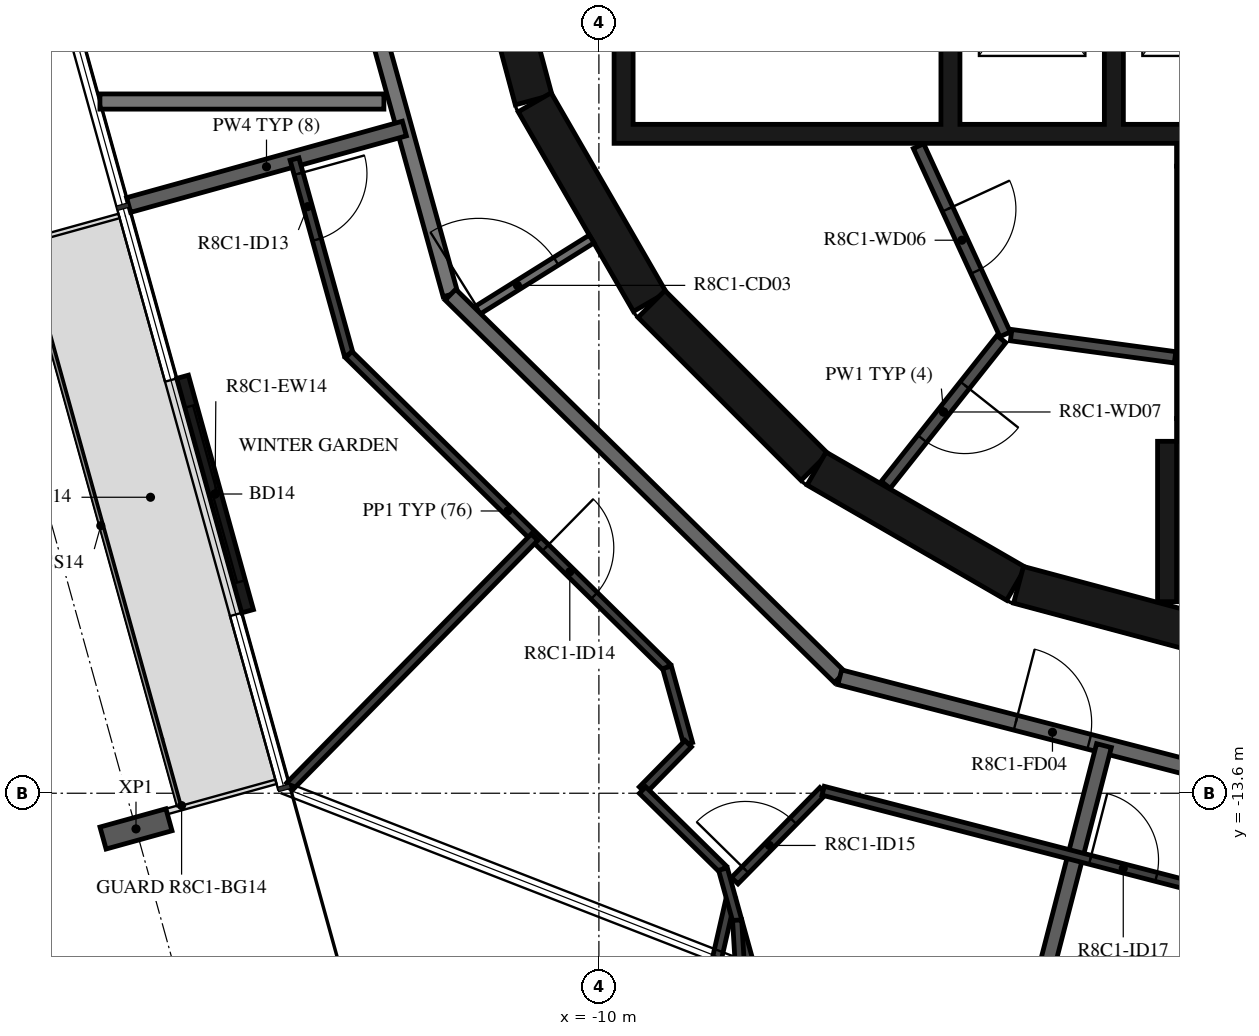
"""IFC4 building model, lengths in metres.
Left out: names, types, materials, properties, quantities, classifications, styles, units other than length and angle.
Written with IfcOpenShell. Run it as: python <this file> out.ifc"""

import sys

from ifc_helpers import new_model, si_unit, direction, frame, frame_2d, origin, origin_2d, place, context, subcontext, project, spatial, polyline, rectangle, i_section, outline, extrude, element, fill, save


model = new_model("IFC4")
c1 = context("Model", 3, precision=1e-05, world=origin(), true_north=direction((0.0, 1.0)))
c2 = subcontext(c1, "Body", "Model", "MODEL_VIEW")
j1 = project(units=[si_unit("LENGTHUNIT", "METRE"), si_unit("PLANEANGLEUNIT", "RADIAN")], contexts=[c1])
p1 = place(None, origin())
s1 = spatial("IfcSite", under=j1, at=p1, CompositionType="ELEMENT")
p2 = place(p1, origin())
s2 = spatial("IfcBuilding", under=s1, at=p2, CompositionType="ELEMENT")
p3 = place(p2, frame((0.0, 0.0, 322.7)))
s3 = spatial("IfcBuildingStorey", under=s2, at=p3, CompositionType="ELEMENT", Elevation=322.7)
p4 = place(p3, frame((-16.09, -14.069, -0.38), z_axis=(0.0, 0.0, 1.0), x_axis=(-0.267238143562, 0.963630517691, 0.0)))
e1 = element("IfcColumn", 1, at=p4, inside=s3, PredefinedType="COLUMN", context=c2, shape_type="SweptSolid", body=[
    extrude(i_section(OverallWidth=0.3, OverallDepth=0.9, WebThickness=0.019, FlangeThickness=0.035, FilletRadius=0.03, at=origin_2d()), origin(), (0.0, 0.0, 1.0), 2.616),
])
p5 = place(p3, frame((-15.477, -8.122, 0.0), z_axis=(0.0, 0.0, 1.0), x_axis=(0.267195229387, -0.963642417805, 0.0)))
e2 = element("IfcWall", 2, at=p5, inside=s3, PredefinedType="STANDARD", context=c2, shape_type="SweptSolid", body=[
    extrude(rectangle(XDim=3.2, YDim=0.16, at=frame_2d((1.6, 0.0))), origin(), (0.0, 0.0, 1.0), 3.05),
])
p6 = place(p5, frame((0.4, 0.0, 0.0)))
e3 = element("IfcOpeningElement", 3, at=p6, cuts=e2, PredefinedType="OPENING", context=c2, shape_type="SweptSolid", body=[
    extrude(rectangle(XDim=2.4, YDim=2.4, at=frame_2d((1.2, 1.2))), frame((0.0, 0.09, 0.0), z_axis=(0.0, -1.0, 0.0), x_axis=(1.0, 0.0, 0.0)), (0.0, 0.0, 1.0), 0.18),
])
p7 = place(p3, frame((-11.643, -1.55, 0.0), z_axis=(0.0, 0.0, 1.0), x_axis=(0.258734743916, -0.965948410781, 0.0)))
e4 = element("IfcWall", 4, at=p7, inside=s3, PredefinedType="SHEAR", context=c2, shape_type="SweptSolid", body=[
    extrude(rectangle(XDim=3.033, YDim=0.5, at=frame_2d((1.516, 0.0))), origin(), (0.0, 0.0, 1.0), 3.05),
])
p8 = place(p7, frame((1.066, 0.0, 0.0)))
e5 = element("IfcOpeningElement", 5, at=p8, cuts=e4, PredefinedType="OPENING", context=c2, shape_type="SweptSolid", body=[
    extrude(rectangle(XDim=0.9, YDim=2.1, at=frame_2d((0.45, 1.05))), frame((0.0, 0.26, 0.0), z_axis=(0.0, -1.0, 0.0), x_axis=(1.0, 0.0, 0.0)), (0.0, 0.0, 1.0), 0.52),
])
p9 = place(p3, frame((-10.845, -4.51, 0.0), z_axis=(0.0, 0.0, 1.0), x_axis=(0.500087131594, -0.865975092491, 0.0)))
e6 = element("IfcWall", 6, at=p9, inside=s3, PredefinedType="SHEAR", context=c2, shape_type="SweptSolid", body=[
    extrude(rectangle(XDim=3.033, YDim=0.5, at=frame_2d((1.516, 0.0))), origin(), (0.0, 0.0, 1.0), 3.05),
])
p10 = place(p3, frame((-9.308, -7.164, 0.0), z_axis=(0.0, 0.0, 1.0), x_axis=(0.707106781187, -0.707106781187, 0.0)))
e7 = element("IfcWall", 7, at=p10, inside=s3, PredefinedType="SHEAR", context=c2, shape_type="SweptSolid", body=[
    extrude(rectangle(XDim=3.032, YDim=0.5, at=frame_2d((1.516, 0.0))), origin(), (0.0, 0.0, 1.0), 3.05),
])
for number, where, z_axis, x_axis in (
    (8, (-7.137, -9.329, 0.0), (0.0, 0.0, 1.0), (0.866, -0.5, 0.0)),
    (9, (-4.479, -10.858, 0.0), (0.0, 0.0, 1.0), (0.966, -0.259, 0.0)),
):
    element("IfcWall", number, at=place(p3, frame(where, z_axis=z_axis, x_axis=x_axis)), inside=s3, PredefinedType="SHEAR", context=c2, shape_type="SweptSolid", body=[
        extrude(rectangle(XDim=3.033, YDim=0.5, at=frame_2d((1.516, 0.0))), origin(), (0.0, 0.0, 1.0), 3.05),
    ])
p11 = place(p3, frame((-2.275, -8.67, 0.0), z_axis=(0.0, 0.0, 1.0), x_axis=(0.0, 1.0, 0.0)))
e10 = element("IfcWall", 10, at=p11, inside=s3, PredefinedType="SHEAR", context=c2, shape_type="SweptSolid", body=[
    extrude(rectangle(XDim=3.32, YDim=0.25, at=frame_2d((1.66, 0.0))), origin(), (0.0, 0.0, 1.0), 3.05),
])
p12 = place(p3, frame((-2.4, -5.2, 0.0), z_axis=(0.0, 0.0, 1.0), x_axis=(1.0, 0.0, 0.0)))
e11 = element("IfcWall", 11, at=p12, inside=s3, PredefinedType="SHEAR", context=c2, shape_type="SweptSolid", body=[
    extrude(rectangle(XDim=7.05, YDim=0.3, at=frame_2d((3.525, 0.0))), origin(), (0.0, 0.0, 1.0), 3.05),
])
p13 = place(p3, frame((-2.4, -8.82, 0.0), z_axis=(0.0, 0.0, 1.0), x_axis=(1.0, 0.0, 0.0)))
e12 = element("IfcWall", 12, at=p13, inside=s3, PredefinedType="SHEAR", context=c2, shape_type="SweptSolid", body=[
    extrude(rectangle(XDim=2.5, YDim=0.3, at=frame_2d((1.25, 0.0))), origin(), (0.0, 0.0, 1.0), 3.05),
])
p14 = place(p13, frame((0.65, 0.0, 0.0)))
e13 = element("IfcOpeningElement", 13, at=p14, cuts=e12, PredefinedType="OPENING", context=c2, shape_type="SweptSolid", body=[
    extrude(rectangle(XDim=1.2, YDim=2.1, at=frame_2d((0.6, 1.05))), frame((0.0, 0.16, 0.0), z_axis=(0.0, -1.0, 0.0), x_axis=(1.0, 0.0, 0.0)), (0.0, 0.0, 1.0), 0.32),
])
p15 = place(p3, frame((-2.525, -8.97, 0.0), z_axis=(0.0, 0.0, 1.0), x_axis=(0.0, -1.0, 0.0)))
e14 = element("IfcWall", 14, at=p15, inside=s3, PredefinedType="SHEAR", context=c2, shape_type="SweptSolid", body=[
    extrude(rectangle(XDim=2.11, YDim=0.25, at=frame_2d((1.055, 0.0))), origin(), (0.0, 0.0, 1.0), 3.05),
])
p16 = place(p3, origin())
e15 = element("IfcWall", 15, at=p16, inside=s3, PredefinedType="SHEAR", context=c2, shape_type="SweptSolid", body=[
    extrude(outline(polyline([(9.8, -5.05), (9.8, -4.8), (9.8, -1.9), (9.55, -1.9), (9.55, -4.8), (7.65, -4.8), (7.65, -1.9), (7.4, -1.9), (7.4, -4.8), (5.5, -4.8), (5.5, -1.9), (5.25, -1.9), (5.25, -4.8), (3.35, -4.8), (3.35, -1.9), (3.1, -1.9), (3.1, -4.8), (1.2, -4.8), (1.2, -1.9), (0.95, -1.9), (0.95, -4.8), (-0.95, -4.8), (-0.95, -1.9), (-1.2, -1.9), (-1.2, -4.8), (-3.1, -4.8), (-3.1, -1.9), (-3.35, -1.9), (-3.35, -4.8), (-5.25, -4.8), (-5.25, -1.9), (-5.5, -1.9), (-5.5, -4.8), (-9.55, -4.8), (-9.55, -1.9), (-9.8, -1.9), (-9.8, -4.8), (-9.8, -5.05), (9.8, -5.05)])), origin(), (0.0, 0.0, 1.0), 3.05),
])
p17 = place(p3, frame((-5.795, -5.086, 0.0), z_axis=(0.0, 0.0, 1.0), x_axis=(0.417887867606, -0.908498613157, 0.0)))
e16 = element("IfcWall", 16, at=p17, inside=s3, PredefinedType="PARTITIONING", context=c2, shape_type="SweptSolid", body=[
    extrude(rectangle(XDim=2.726, YDim=0.15, at=frame_2d((1.363, 0.0))), origin(), (0.0, 0.0, 1.0), 3.05),
])
p18 = place(p17, frame((0.913, 0.0, 0.0)))
e17 = element("IfcOpeningElement", 17, at=p18, cuts=e16, PredefinedType="OPENING", context=c2, shape_type="SweptSolid", body=[
    extrude(rectangle(XDim=0.9, YDim=2.1, at=frame_2d((0.45, 1.05))), frame((0.0, 0.085, 0.0), z_axis=(0.0, -1.0, 0.0), x_axis=(1.0, 0.0, 0.0)), (0.0, 0.0, 1.0), 0.17),
])
p19 = place(p3, frame((-4.706, -7.625, 0.0), z_axis=(0.0, 0.0, 1.0), x_axis=(-0.621392599334, -0.783499353856, 0.0)))
e18 = element("IfcWall", 18, at=p19, inside=s3, PredefinedType="PARTITIONING", context=c2, shape_type="SweptSolid", body=[
    extrude(rectangle(XDim=2.447, YDim=0.15, at=frame_2d((1.224, 0.0))), origin(), (0.0, 0.0, 1.0), 3.05),
])
p20 = place(p19, frame((0.774, 0.0, 0.0)))
e19 = element("IfcOpeningElement", 19, at=p20, cuts=e18, PredefinedType="OPENING", context=c2, shape_type="SweptSolid", body=[
    extrude(rectangle(XDim=0.9, YDim=2.1, at=frame_2d((0.45, 1.05))), frame((0.0, 0.085, 0.0), z_axis=(0.0, -1.0, 0.0), x_axis=(1.0, 0.0, 0.0)), (0.0, 0.0, 1.0), 0.17),
])
p21 = place(p3, frame((-2.42, -7.865, 0.0), z_axis=(0.0, 0.0, 1.0), x_axis=(-0.990972299108, 0.134066783362, 0.0)))
e20 = element("IfcWall", 20, at=p21, inside=s3, PredefinedType="PARTITIONING", context=c2, shape_type="SweptSolid", body=[
    extrude(rectangle(XDim=2.176, YDim=0.15, at=frame_2d((1.088, 0.0))), origin(), (0.0, 0.0, 1.0), 3.05),
])
p22 = place(p3, frame((-11.687, -7.303, 0.0), z_axis=(0.0, 0.0, 1.0), x_axis=(0.848064094072, 0.529893661357, 0.0)))
e21 = element("IfcWall", 21, at=p22, inside=s3, PredefinedType="PARTITIONING", context=c2, shape_type="SweptSolid", body=[
    extrude(rectangle(XDim=1.876, YDim=0.12, at=frame_2d((0.938, 0.0))), origin(), (0.0, 0.0, 1.0), 3.05),
])
p23 = place(p22, frame((0.125, 0.0, 0.0)))
e22 = element("IfcOpeningElement", 22, at=p23, cuts=e21, PredefinedType="OPENING", context=c2, shape_type="SweptSolid", body=[
    extrude(rectangle(XDim=1.2, YDim=2.1, at=frame_2d((0.6, 1.05))), frame((0.0, 0.07, 0.0), z_axis=(0.0, -1.0, 0.0), x_axis=(1.0, 0.0, 0.0)), (0.0, 0.0, 1.0), 0.14),
])
p24 = place(p3, frame((-13.872, -0.121, 0.0), z_axis=(0.0, 0.0, 1.0), x_axis=(0.267254575108, -0.963625960674, 0.0)))
e23 = element("IfcWall", 23, at=p24, inside=s3, PredefinedType="STANDARD", context=c2, shape_type="SweptSolid", body=[
    extrude(rectangle(XDim=7.181, YDim=0.2, at=frame_2d((3.591, 0.0))), origin(), (0.0, 0.0, 1.0), 3.05),
])
p25 = place(p3, frame((-11.953, -7.041, 0.0), z_axis=(0.0, 0.0, 1.0), x_axis=(0.713250549143, -0.70090916255, 0.0)))
e24 = element("IfcWall", 24, at=p25, inside=s3, PredefinedType="STANDARD", context=c2, shape_type="SweptSolid", body=[
    extrude(rectangle(XDim=7.181, YDim=0.2, at=frame_2d((3.59, 0.0))), origin(), (0.0, 0.0, 1.0), 3.05),
])
p26 = place(p3, frame((-6.831, -12.074, 0.0), z_axis=(0.0, 0.0, 1.0), x_axis=(0.968144780225, -0.250391063186, 0.0)))
e25 = element("IfcWall", 25, at=p26, inside=s3, PredefinedType="STANDARD", context=c2, shape_type="SweptSolid", body=[
    extrude(rectangle(XDim=7.181, YDim=0.2, at=frame_2d((3.591, 0.0))), origin(), (0.0, 0.0, 1.0), 3.05),
])
p27 = place(p26, frame((2.39, 0.0, 0.0)))
e26 = element("IfcOpeningElement", 26, at=p27, cuts=e25, PredefinedType="OPENING", context=c2, shape_type="SweptSolid", body=[
    extrude(rectangle(XDim=1.0, YDim=2.1, at=frame_2d((0.5, 1.05))), frame((0.0, 0.11, 0.0), z_axis=(0.0, -1.0, 0.0), x_axis=(1.0, 0.0, 0.0)), (0.0, 0.0, 1.0), 0.22),
])
p28 = place(p26, frame((5.69, 0.0, 0.0)))
e27 = element("IfcOpeningElement", 27, at=p28, cuts=e25, PredefinedType="OPENING", context=c2, shape_type="SweptSolid", body=[
    extrude(rectangle(XDim=1.0, YDim=2.1, at=frame_2d((0.5, 1.05))), frame((0.0, 0.11, 0.0), z_axis=(0.0, -1.0, 0.0), x_axis=(1.0, 0.0, 0.0)), (0.0, 0.0, 1.0), 0.22),
])
p29 = place(p3, frame((-16.564, -4.5, 0.0), z_axis=(0.0, 0.0, 1.0), x_axis=(1.0, 0.0, 0.0)))
e28 = element("IfcWall", 28, at=p29, inside=s3, PredefinedType="STANDARD", context=c2, shape_type="SweptSolid", body=[
    extrude(rectangle(XDim=3.736, YDim=0.2, at=frame_2d((1.868, 0.0))), origin(), (0.0, 0.0, 1.0), 3.05),
])
p30 = place(p3, frame((-16.187, -5.862, 0.0), z_axis=(0.0, 0.0, 1.0), x_axis=(0.963631166683, 0.267235803358, 0.0)))
e29 = element("IfcWall", 29, at=p30, inside=s3, PredefinedType="STANDARD", context=c2, shape_type="SweptSolid", body=[
    extrude(rectangle(XDim=3.765, YDim=0.2, at=frame_2d((1.882, 0.0))), origin(), (0.0, 0.0, 1.0), 3.05),
])
p31 = place(p3, frame((-4.214, -16.295, 0.0), z_axis=(0.0, 0.0, 1.0), x_axis=(0.250428810918, 0.968135016752, 0.0)))
e30 = element("IfcWall", 30, at=p31, inside=s3, PredefinedType="STANDARD", context=c2, shape_type="SweptSolid", body=[
    extrude(rectangle(XDim=3.432, YDim=0.2, at=frame_2d((1.716, 0.0))), origin(), (0.0, 0.0, 1.0), 3.05),
])
p32 = place(p3, frame((-14.005, -5.256, 0.0), z_axis=(0.0, 0.0, 1.0), x_axis=(0.267200500487, -0.963640956238, 0.0)))
e31 = element("IfcWall", 31, at=p32, inside=s3, PredefinedType="PARTITIONING", context=c2, shape_type="SweptSolid", body=[
    extrude(rectangle(XDim=2.67, YDim=0.12, at=frame_2d((1.335, 0.0))), origin(), (0.0, 0.0, 1.0), 3.05),
])
p33 = place(p32, frame((0.2, 0.0, 0.0)))
e32 = element("IfcOpeningElement", 32, at=p33, cuts=e31, PredefinedType="OPENING", context=c2, shape_type="SweptSolid", body=[
    extrude(rectangle(XDim=0.9, YDim=2.1, at=frame_2d((0.45, 1.05))), frame((0.0, 0.07, 0.0), z_axis=(0.0, -1.0, 0.0), x_axis=(1.0, 0.0, 0.0)), (0.0, 0.0, 1.0), 0.14),
])
p34 = place(p3, frame((-13.291, -7.829, 0.0), z_axis=(0.0, 0.0, 1.0), x_axis=(0.713255094589, -0.700904537039, 0.0)))
e33 = element("IfcWall", 33, at=p34, inside=s3, PredefinedType="PARTITIONING", context=c2, shape_type="SweptSolid", body=[
    extrude(rectangle(XDim=5.871, YDim=0.12, at=frame_2d((2.936, 0.0))), origin(), (0.0, 0.0, 1.0), 3.05),
])
p35 = place(p34, frame((3.627, 0.0, 0.0)))
e34 = element("IfcOpeningElement", 34, at=p35, cuts=e33, PredefinedType="OPENING", context=c2, shape_type="SweptSolid", body=[
    extrude(rectangle(XDim=0.9, YDim=2.1, at=frame_2d((0.45, 1.05))), frame((0.0, 0.07, 0.0), z_axis=(0.0, -1.0, 0.0), x_axis=(1.0, 0.0, 0.0)), (0.0, 0.0, 1.0), 0.14),
])
p36 = place(p3, frame((-9.104, -11.944, 0.0), z_axis=(0.0, 0.0, 1.0), x_axis=(0.267317596771, -0.963608479859, 0.0)))
e35 = element("IfcWall", 35, at=p36, inside=s3, PredefinedType="PARTITIONING", context=c2, shape_type="SweptSolid", body=[
    extrude(rectangle(XDim=1.042, YDim=0.12, at=frame_2d((0.521, 0.0))), origin(), (0.0, 0.0, 1.0), 3.05),
])
p37 = place(p3, frame((-8.825, -12.948, 0.0), z_axis=(0.0, 0.0, 1.0), x_axis=(-0.700949034431, -0.713211364976, 0.0)))
e36 = element("IfcWall", 36, at=p37, inside=s3, PredefinedType="PARTITIONING", context=c2, shape_type="SweptSolid", body=[
    extrude(rectangle(XDim=0.856, YDim=0.12, at=frame_2d((0.428, 0.0))), origin(), (0.0, 0.0, 1.0), 3.05),
])
p38 = place(p3, frame((-9.425, -13.559, 0.0), z_axis=(0.0, 0.0, 1.0), x_axis=(0.713255540994, -0.700904082768, 0.0)))
e37 = element("IfcWall", 37, at=p38, inside=s3, PredefinedType="PARTITIONING", context=c2, shape_type="SweptSolid", body=[
    extrude(rectangle(XDim=1.482, YDim=0.12, at=frame_2d((0.741, 0.0))), origin(), (0.0, 0.0, 1.0), 3.05),
])
p39 = place(p3, frame((-8.213, -14.75, 0.0), z_axis=(0.0, 0.0, 1.0), x_axis=(0.700899260151, 0.713260280066, 0.0)))
e38 = element("IfcWall", 38, at=p39, inside=s3, PredefinedType="PARTITIONING", context=c2, shape_type="SweptSolid", body=[
    extrude(rectangle(XDim=1.659, YDim=0.12, at=frame_2d((0.83, 0.0))), origin(), (0.0, 0.0, 1.0), 3.05),
])
p40 = place(p39, frame((0.2, 0.0, 0.0)))
e39 = element("IfcOpeningElement", 39, at=p40, cuts=e38, PredefinedType="OPENING", context=c2, shape_type="SweptSolid", body=[
    extrude(rectangle(XDim=0.9, YDim=2.1, at=frame_2d((0.45, 1.05))), frame((0.0, 0.07, 0.0), z_axis=(0.0, -1.0, 0.0), x_axis=(1.0, 0.0, 0.0)), (0.0, 0.0, 1.0), 0.14),
])
p41 = place(p3, frame((-7.05, -13.567, 0.0), z_axis=(0.0, 0.0, 1.0), x_axis=(0.968142373865, -0.250400367264, 0.0)))
e40 = element("IfcWall", 40, at=p41, inside=s3, PredefinedType="PARTITIONING", context=c2, shape_type="SweptSolid", body=[
    extrude(rectangle(XDim=7.421, YDim=0.12, at=frame_2d((3.71, 0.0))), origin(), (0.0, 0.0, 1.0), 3.05),
])
p42 = place(p41, frame((3.628, 0.0, 0.0)))
e41 = element("IfcOpeningElement", 41, at=p42, cuts=e40, PredefinedType="OPENING", context=c2, shape_type="SweptSolid", body=[
    extrude(rectangle(XDim=0.9, YDim=2.1, at=frame_2d((0.45, 1.05))), frame((0.0, 0.07, 0.0), z_axis=(0.0, -1.0, 0.0), x_axis=(1.0, 0.0, 0.0)), (0.0, 0.0, 1.0), 0.14),
])
p43 = place(p3, frame((-14.066, -13.508, 0.0), z_axis=(0.0, 0.0, 1.0), x_axis=(0.700941781432, 0.7132184932, 0.0)))
e42 = element("IfcWall", 42, at=p43, inside=s3, PredefinedType="PARTITIONING", context=c2, shape_type="SweptSolid", body=[
    extrude(rectangle(XDim=4.594, YDim=0.12, at=frame_2d((2.297, 0.0))), origin(), (0.0, 0.0, 1.0), 3.05),
])
p44 = place(p3, frame((-10.187, -23.406, 0.0), z_axis=(0.0, 0.0, 1.0), x_axis=(0.222411648081, 0.974952849526, 0.0)))
e43 = element("IfcWall", 43, at=p44, inside=s3, PredefinedType="PARTITIONING", context=c2, shape_type="SweptSolid", body=[
    extrude(rectangle(XDim=8.649, YDim=0.12, at=frame_2d((4.324, 0.0))), origin(), (0.0, 0.0, 1.0), 3.05),
])
p45 = place(p44, frame((0.6, 0.0, 0.0)))
e44 = element("IfcOpeningElement", 44, at=p45, cuts=e43, PredefinedType="OPENING", context=c2, shape_type="SweptSolid", body=[
    extrude(rectangle(XDim=0.9, YDim=2.1, at=frame_2d((0.45, 1.05))), frame((0.0, 0.07, 0.0), z_axis=(0.0, -1.0, 0.0), x_axis=(1.0, 0.0, 0.0)), (0.0, 0.0, 1.0), 0.14),
])
p46 = place(p3, frame((-7.368, -18.202, 0.0), z_axis=(0.0, 0.0, 1.0), x_axis=(-0.267246564077, 0.963628182438, 0.0)))
e45 = element("IfcWall", 45, at=p46, inside=s3, PredefinedType="PARTITIONING", context=c2, shape_type="SweptSolid", body=[
    extrude(rectangle(XDim=3.74, YDim=0.12, at=frame_2d((1.87, 0.0))), origin(), (0.0, 0.0, 1.0), 3.05),
])
p47 = place(p3, frame((-7.587, -25.148, 0.0), z_axis=(0.0, 0.0, 1.0), x_axis=(-0.060023558623, 0.99819696073, 0.0)))
e46 = element("IfcWall", 46, at=p47, inside=s3, PredefinedType="PARTITIONING", context=c2, shape_type="SweptSolid", body=[
    extrude(rectangle(XDim=9.896, YDim=0.12, at=frame_2d((4.948, 0.0))), origin(), (0.0, 0.0, 1.0), 3.05),
])
p48 = place(p47, frame((1.8, 0.0, 0.0)))
e47 = element("IfcOpeningElement", 47, at=p48, cuts=e46, PredefinedType="OPENING", context=c2, shape_type="SweptSolid", body=[
    extrude(rectangle(XDim=0.8, YDim=2.1, at=frame_2d((0.4, 1.05))), frame((0.0, 0.07, 0.0), z_axis=(0.0, -1.0, 0.0), x_axis=(1.0, 0.0, 0.0)), (0.0, 0.0, 1.0), 0.14),
])
p49 = place(p6, origin())
e48 = element("IfcDoor", 48, at=p49, inside=s3, OperationType="DOUBLE_DOOR_SLIDING", PredefinedType="DOOR", context=c2, shape_type="SweptSolid", body=[
    extrude(rectangle(XDim=2.4, YDim=2.4, at=frame_2d((1.2, 1.2))), frame((0.0, 0.025, 0.0), z_axis=(0.0, -1.0, 0.0), x_axis=(1.0, 0.0, 0.0)), (0.0, 0.0, 1.0), 0.05),
])
fill(e3, e48)
p50 = place(p18, origin())
e49 = element("IfcDoor", 49, at=p50, inside=s3, OperationType="SINGLE_SWING_RIGHT", PredefinedType="DOOR", context=c2, shape_type="SweptSolid", body=[
    extrude(rectangle(XDim=0.9, YDim=2.1, at=frame_2d((0.45, 1.05))), frame((0.0, 0.025, 0.0), z_axis=(0.0, -1.0, 0.0), x_axis=(1.0, 0.0, 0.0)), (0.0, 0.0, 1.0), 0.05),
])
fill(e17, e49)
p51 = place(p20, origin())
e50 = element("IfcDoor", 50, at=p51, inside=s3, OperationType="SINGLE_SWING_LEFT", PredefinedType="DOOR", context=c2, shape_type="SweptSolid", body=[
    extrude(rectangle(XDim=0.9, YDim=2.1, at=frame_2d((0.45, 1.05))), frame((0.0, 0.025, 0.0), z_axis=(0.0, -1.0, 0.0), x_axis=(1.0, 0.0, 0.0)), (0.0, 0.0, 1.0), 0.05),
])
fill(e19, e50)
p52 = place(p27, origin())
e51 = element("IfcDoor", 51, at=p52, inside=s3, OperationType="SINGLE_SWING_RIGHT", PredefinedType="DOOR", context=c2, shape_type="SweptSolid", body=[
    extrude(rectangle(XDim=1.0, YDim=2.1, at=frame_2d((0.5, 1.05))), frame((0.0, 0.025, 0.0), z_axis=(0.0, -1.0, 0.0), x_axis=(1.0, 0.0, 0.0)), (0.0, 0.0, 1.0), 0.05),
])
fill(e26, e51)
p53 = place(p33, origin())
e52 = element("IfcDoor", 52, at=p53, inside=s3, OperationType="SINGLE_SWING_RIGHT", PredefinedType="DOOR", context=c2, shape_type="SweptSolid", body=[
    extrude(rectangle(XDim=0.9, YDim=2.1, at=frame_2d((0.45, 1.05))), frame((0.0, 0.025, 0.0), z_axis=(0.0, -1.0, 0.0), x_axis=(1.0, 0.0, 0.0)), (0.0, 0.0, 1.0), 0.05),
])
fill(e32, e52)
p54 = place(p35, origin())
e53 = element("IfcDoor", 53, at=p54, inside=s3, OperationType="SINGLE_SWING_RIGHT", PredefinedType="DOOR", context=c2, shape_type="SweptSolid", body=[
    extrude(rectangle(XDim=0.9, YDim=2.1, at=frame_2d((0.45, 1.05))), frame((0.0, 0.025, 0.0), z_axis=(0.0, -1.0, 0.0), x_axis=(1.0, 0.0, 0.0)), (0.0, 0.0, 1.0), 0.05),
])
fill(e34, e53)
p55 = place(p40, origin())
e54 = element("IfcDoor", 54, at=p55, inside=s3, OperationType="SINGLE_SWING_LEFT", PredefinedType="DOOR", context=c2, shape_type="SweptSolid", body=[
    extrude(rectangle(XDim=0.9, YDim=2.1, at=frame_2d((0.45, 1.05))), frame((0.0, 0.025, 0.0), z_axis=(0.0, -1.0, 0.0), x_axis=(1.0, 0.0, 0.0)), (0.0, 0.0, 1.0), 0.05),
])
fill(e39, e54)
p56 = place(p42, origin())
e55 = element("IfcDoor", 55, at=p56, inside=s3, OperationType="SINGLE_SWING_RIGHT", PredefinedType="DOOR", context=c2, shape_type="SweptSolid", body=[
    extrude(rectangle(XDim=0.9, YDim=2.1, at=frame_2d((0.45, 1.05))), frame((0.0, 0.025, 0.0), z_axis=(0.0, -1.0, 0.0), x_axis=(1.0, 0.0, 0.0)), (0.0, 0.0, 1.0), 0.05),
])
fill(e41, e55)
p57 = place(p23, origin())
e56 = element("IfcDoor", 56, at=p57, inside=s3, OperationType="DOUBLE_DOOR_SINGLE_SWING", PredefinedType="DOOR", context=c2, shape_type="SweptSolid", body=[
    extrude(rectangle(XDim=1.2, YDim=2.1, at=frame_2d((0.6, 1.05))), frame((0.0, 0.025, 0.0), z_axis=(0.0, -1.0, 0.0), x_axis=(1.0, 0.0, 0.0)), (0.0, 0.0, 1.0), 0.05),
])
fill(e22, e56)
save(model, sys.argv[1])
